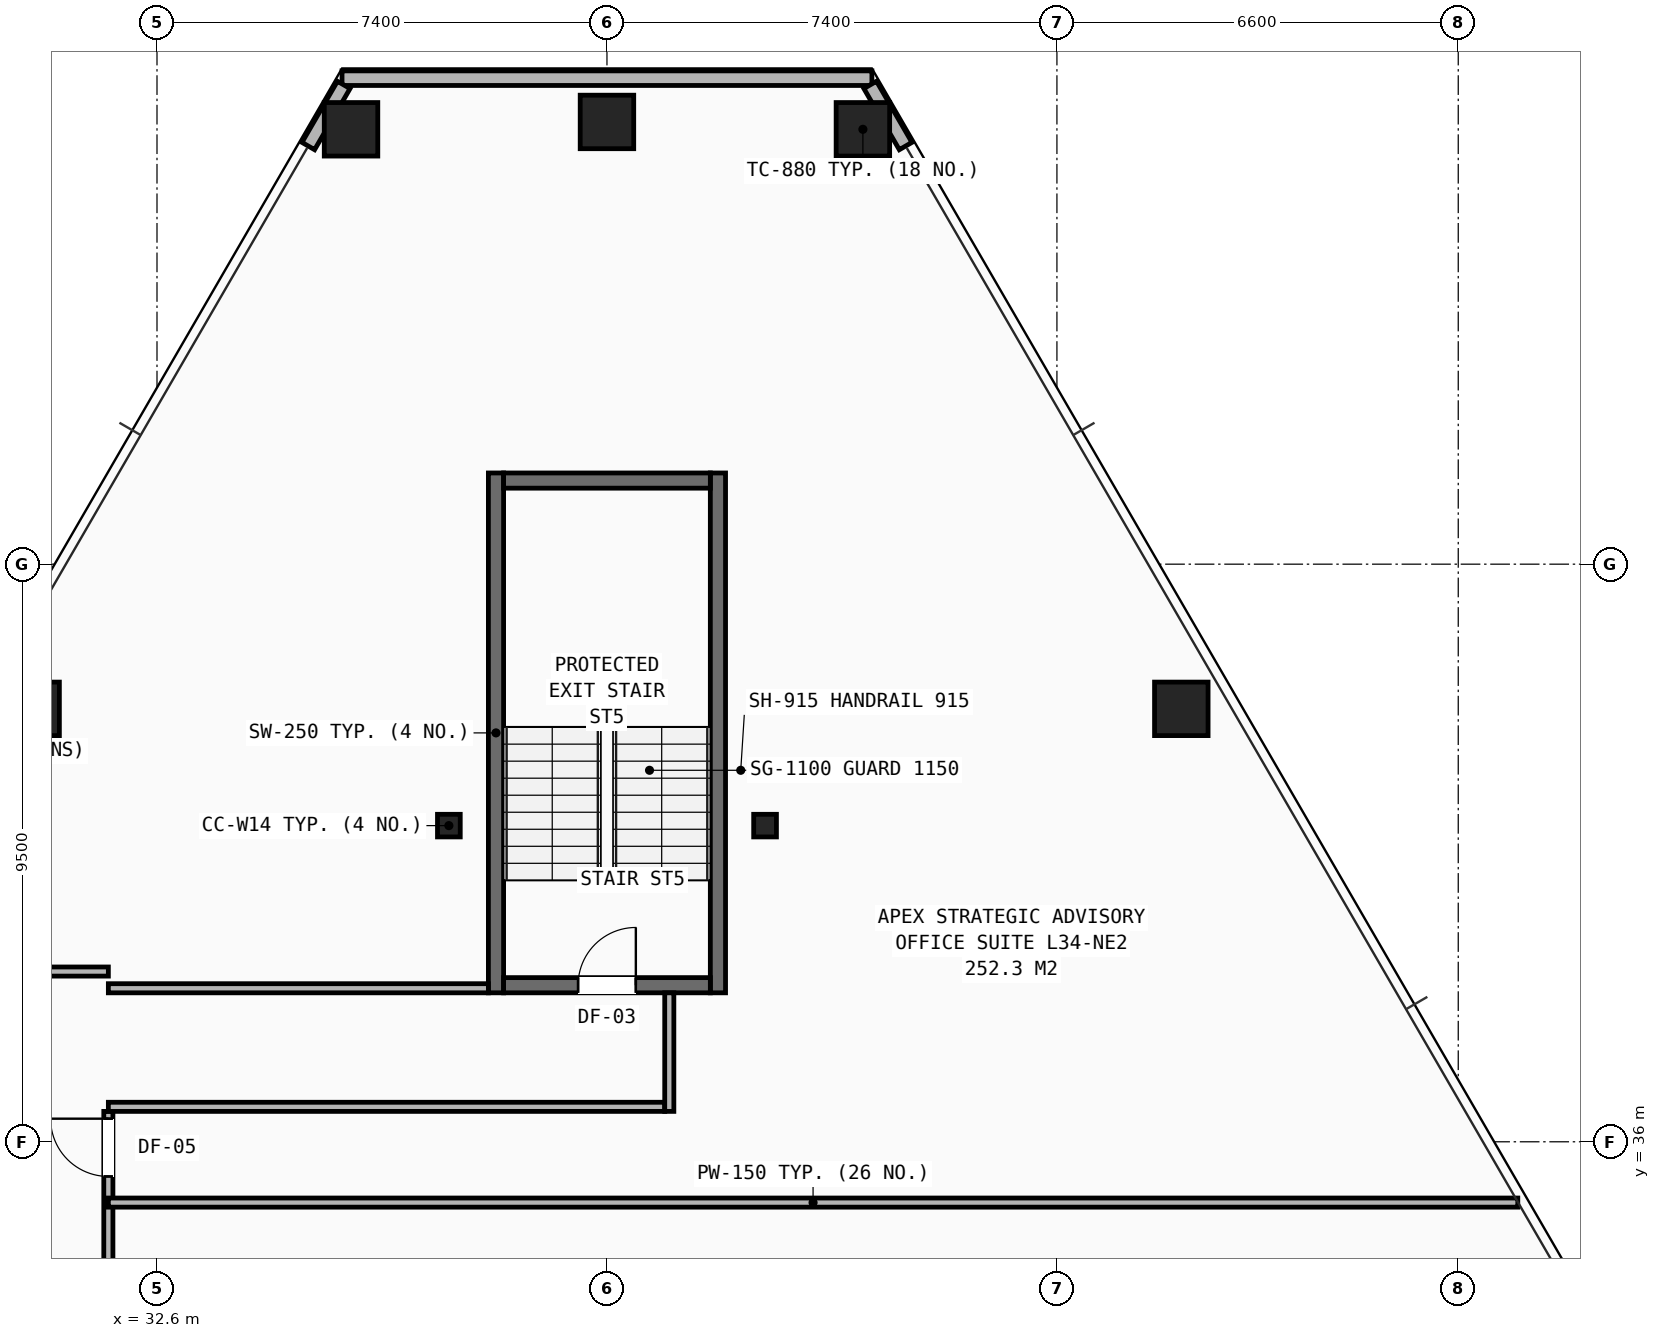
"""IFC4 building model, lengths in metres.
Left out: names, types, materials, properties, quantities, classifications, styles, units other than length and angle.
Written with IfcOpenShell. Run it as: python <this file> out.ifc"""

import sys

from ifc_helpers import new_model, si_unit, direction, frame, frame_2d, origin, origin_2d, place, context, subcontext, project, spatial, rectangle, hollow_rectangle, i_section, extrude, element, fill, save


model = new_model("IFC4")
c1 = context("Model", 3, precision=1e-05, world=origin(), true_north=direction((0.0, 1.0)))
c2 = subcontext(c1, "Body", "Model", "MODEL_VIEW")
j1 = project(units=[si_unit("LENGTHUNIT", "METRE"), si_unit("PLANEANGLEUNIT", "RADIAN")], contexts=[c1])
p1 = place(None, origin())
s1 = spatial("IfcSite", under=j1, at=p1, CompositionType="ELEMENT")
p2 = place(p1, origin())
s2 = spatial("IfcBuilding", under=s1, at=p2, CompositionType="ELEMENT")
p3 = place(p2, frame((0.0, 0.0, 119.45)))
s3 = spatial("IfcBuildingStorey", under=s2, at=p3, CompositionType="ELEMENT", Elevation=119.45)
for number, where, z_axis, x_axis in (
    (1, (37.4, 41.2, 0.0), (0.0, 0.0, 1.0), (1.0, 0.0, 0.0)),
    (2, (42.6, 41.2, 0.0), (0.0, 0.0, 1.0), (1.0, 0.0, 0.0)),
):
    element("IfcColumn", number, at=place(p3, frame(where, z_axis=z_axis, x_axis=x_axis)), inside=s3, PredefinedType="COLUMN", context=c2, shape_type="SweptSolid", body=[
        extrude(i_section(OverallWidth=0.374, OverallDepth=0.372, WebThickness=0.016, FlangeThickness=0.026, at=origin_2d()), origin(), (0.0, 0.0, 1.0), 3.45),
    ])
for number, where, z_axis, x_axis in (
    (3, (44.209, 52.652, 0.0), (0.0, 0.0, 1.0), (1.0, 0.0, 0.0)),
    (4, (40.0, 52.773, 0.0), (0.0, 0.0, 1.0), (1.0, 0.0, 0.0)),
    (5, (35.791, 52.652, 0.0), (0.0, 0.0, 1.0), (1.0, 0.0, 0.0)),
    (6, (30.554, 43.12, 0.0), (0.0, 0.0, 1.0), (1.0, 0.0, 0.0)),
    (7, (49.446, 43.12, 0.0), (0.0, 0.0, 1.0), (1.0, 0.0, 0.0)),
):
    element("IfcColumn", number, at=place(p3, frame(where, z_axis=z_axis, x_axis=x_axis)), inside=s3, PredefinedType="COLUMN", context=c2, shape_type="SweptSolid", body=[
        extrude(hollow_rectangle(XDim=0.88, YDim=0.88, WallThickness=0.06, at=origin_2d()), origin(), (0.0, 0.0, 1.0), 3.45),
    ])
p4 = place(p3, frame((35.643, 53.493, 0.0), z_axis=(0.0, 0.0, 1.0), x_axis=(1.0, 0.0, 0.0)))
e8 = element("IfcWall", 8, at=p4, inside=s3, PredefinedType="SHEAR", context=c2, shape_type="SweptSolid", body=[
    extrude(rectangle(XDim=8.714, YDim=0.24, at=frame_2d((4.357, 0.0))), origin(), (0.0, 0.0, 1.0), 2.583),
])
for number, where, z_axis, x_axis in (
    (9, (35.671, 53.383, 0.0), (0.0, 0.0, 1.0), (-0.501, -0.865, 0.0)),
    (10, (44.912, 52.377, 0.0), (0.0, 0.0, 1.0), (-0.501, 0.865, 0.0)),
):
    element("IfcWall", number, at=place(p3, frame(where, z_axis=z_axis, x_axis=x_axis)), inside=s3, PredefinedType="SHEAR", context=c2, shape_type="SweptSolid", body=[
        extrude(rectangle(XDim=1.163, YDim=0.24, at=frame_2d((0.581, 0.0))), origin(), (0.0, 0.0, 1.0), 2.583),
    ])
p5 = place(p3, frame((31.8, 31.2, 0.0), z_axis=(0.0, 0.0, 1.0), x_axis=(0.0, 1.0, 0.0)))
e11 = element("IfcWall", 11, at=p5, inside=s3, PredefinedType="PARTITIONING", context=c2, shape_type="SweptSolid", body=[
    extrude(rectangle(XDim=5.3, YDim=0.15, at=frame_2d((2.65, 0.0))), origin(), (0.0, 0.0, 1.0), 2.252),
])
p6 = place(p5, frame((0.5, 0.0, 0.0)))
e12 = element("IfcOpeningElement", 12, at=p6, cuts=e11, PredefinedType="OPENING", context=c2, shape_type="SweptSolid", body=[
    extrude(rectangle(XDim=0.95, YDim=2.1, at=frame_2d((0.475, 1.05))), frame((0.0, 0.085, 0.0), z_axis=(0.0, -1.0, 0.0), x_axis=(1.0, 0.0, 0.0)), (0.0, 0.0, 1.0), 0.17),
])
p7 = place(p5, frame((4.23, 0.0, 0.0)))
e13 = element("IfcOpeningElement", 13, at=p7, cuts=e11, PredefinedType="OPENING", context=c2, shape_type="SweptSolid", body=[
    extrude(rectangle(XDim=0.95, YDim=2.1, at=frame_2d((0.475, 1.05))), frame((0.0, 0.085, 0.0), z_axis=(0.0, -1.0, 0.0), x_axis=(1.0, 0.0, 0.0)), (0.0, 0.0, 1.0), 0.17),
])
p8 = place(p3, frame((29.6, 38.8, 0.0), z_axis=(0.0, 0.0, 1.0), x_axis=(1.0, 0.0, 0.0)))
e14 = element("IfcWall", 14, at=p8, inside=s3, PredefinedType="PARTITIONING", context=c2, shape_type="SweptSolid", body=[
    extrude(rectangle(XDim=2.2, YDim=0.15, at=frame_2d((1.1, 0.0))), origin(), (0.0, 0.0, 1.0), 2.743),
])
p9 = place(p3, frame((31.8, 35.0, 0.0), z_axis=(0.0, 0.0, 1.0), x_axis=(1.0, 0.0, 0.0)))
e15 = element("IfcWall", 15, at=p9, inside=s3, PredefinedType="PARTITIONING", context=c2, shape_type="SweptSolid", body=[
    extrude(rectangle(XDim=23.179, YDim=0.15, at=frame_2d((11.59, 0.0))), origin(), (0.0, 0.0, 1.0), 2.589),
])
for number, where, z_axis, x_axis in (
    (16, (38.175, 38.45, 0.0), (0.0, 0.0, 1.0), (0.0, 1.0, 0.0)),
    (17, (41.825, 38.45, 0.0), (0.0, 0.0, 1.0), (0.0, 1.0, 0.0)),
):
    element("IfcWall", number, at=place(p3, frame(where, z_axis=z_axis, x_axis=x_axis)), inside=s3, PredefinedType="SHEAR", context=c2, shape_type="SweptSolid", body=[
        extrude(rectangle(XDim=8.55, YDim=0.25, at=frame_2d((4.275, 0.0))), origin(), (0.0, 0.0, 1.0), 3.21),
    ])
p10 = place(p3, frame((38.3, 38.575, 0.0), z_axis=(0.0, 0.0, 1.0), x_axis=(1.0, 0.0, 0.0)))
e18 = element("IfcWall", 18, at=p10, inside=s3, PredefinedType="SHEAR", context=c2, shape_type="SweptSolid", body=[
    extrude(rectangle(XDim=3.4, YDim=0.25, at=frame_2d((1.7, 0.0))), origin(), (0.0, 0.0, 1.0), 3.21),
])
p11 = place(p10, frame((1.225, 0.0, 0.0)))
e19 = element("IfcOpeningElement", 19, at=p11, cuts=e18, PredefinedType="OPENING", context=c2, shape_type="SweptSolid", body=[
    extrude(rectangle(XDim=0.95, YDim=2.1, at=frame_2d((0.475, 1.05))), frame((0.0, 0.135, 0.0), z_axis=(0.0, -1.0, 0.0), x_axis=(1.0, 0.0, 0.0)), (0.0, 0.0, 1.0), 0.27),
])
p12 = place(p3, frame((38.3, 46.875, 0.0), z_axis=(0.0, 0.0, 1.0), x_axis=(1.0, 0.0, 0.0)))
e20 = element("IfcWall", 20, at=p12, inside=s3, PredefinedType="SHEAR", context=c2, shape_type="SweptSolid", body=[
    extrude(rectangle(XDim=3.4, YDim=0.25, at=frame_2d((1.7, 0.0))), origin(), (0.0, 0.0, 1.0), 3.21),
])
p13 = place(p3, frame((31.8, 36.575, 0.0), z_axis=(0.0, 0.0, 1.0), x_axis=(1.0, 0.0, 0.0)))
e21 = element("IfcWall", 21, at=p13, inside=s3, PredefinedType="PARTITIONING", context=c2, shape_type="SweptSolid", body=[
    extrude(rectangle(XDim=9.15, YDim=0.15, at=frame_2d((4.575, 0.0))), origin(), (0.0, 0.0, 1.0), 3.21),
])
p14 = place(p3, frame((31.8, 38.525, 0.0), z_axis=(0.0, 0.0, 1.0), x_axis=(1.0, 0.0, 0.0)))
e22 = element("IfcWall", 22, at=p14, inside=s3, PredefinedType="PARTITIONING", context=c2, shape_type="SweptSolid", body=[
    extrude(rectangle(XDim=6.25, YDim=0.15, at=frame_2d((3.125, 0.0))), origin(), (0.0, 0.0, 1.0), 2.743),
])
p15 = place(p3, frame((41.025, 36.5, 0.0), z_axis=(0.0, 0.0, 1.0), x_axis=(0.0, 1.0, 0.0)))
e23 = element("IfcWall", 23, at=p15, inside=s3, PredefinedType="PARTITIONING", context=c2, shape_type="SweptSolid", body=[
    extrude(rectangle(XDim=1.95, YDim=0.15, at=frame_2d((0.975, 0.0))), origin(), (0.0, 0.0, 1.0), 3.21),
])
p16 = place(p7, origin())
e24 = element("IfcDoor", 24, at=p16, inside=s3, OperationType="SINGLE_SWING_RIGHT", PredefinedType="DOOR", context=c2, shape_type="SweptSolid", body=[
    extrude(rectangle(XDim=0.95, YDim=2.1, at=frame_2d((0.475, 1.05))), frame((0.0, 0.025, 0.0), z_axis=(0.0, -1.0, 0.0), x_axis=(1.0, 0.0, 0.0)), (0.0, 0.0, 1.0), 0.05),
])
fill(e13, e24)
p17 = place(p11, origin())
e25 = element("IfcDoor", 25, at=p17, inside=s3, OperationType="SINGLE_SWING_RIGHT", PredefinedType="DOOR", context=c2, shape_type="SweptSolid", body=[
    extrude(rectangle(XDim=0.95, YDim=2.1, at=frame_2d((0.475, 1.05))), frame((0.0, 0.025, 0.0), z_axis=(0.0, -1.0, 0.0), x_axis=(1.0, 0.0, 0.0)), (0.0, 0.0, 1.0), 0.05),
])
fill(e19, e25)
save(model, sys.argv[1])
